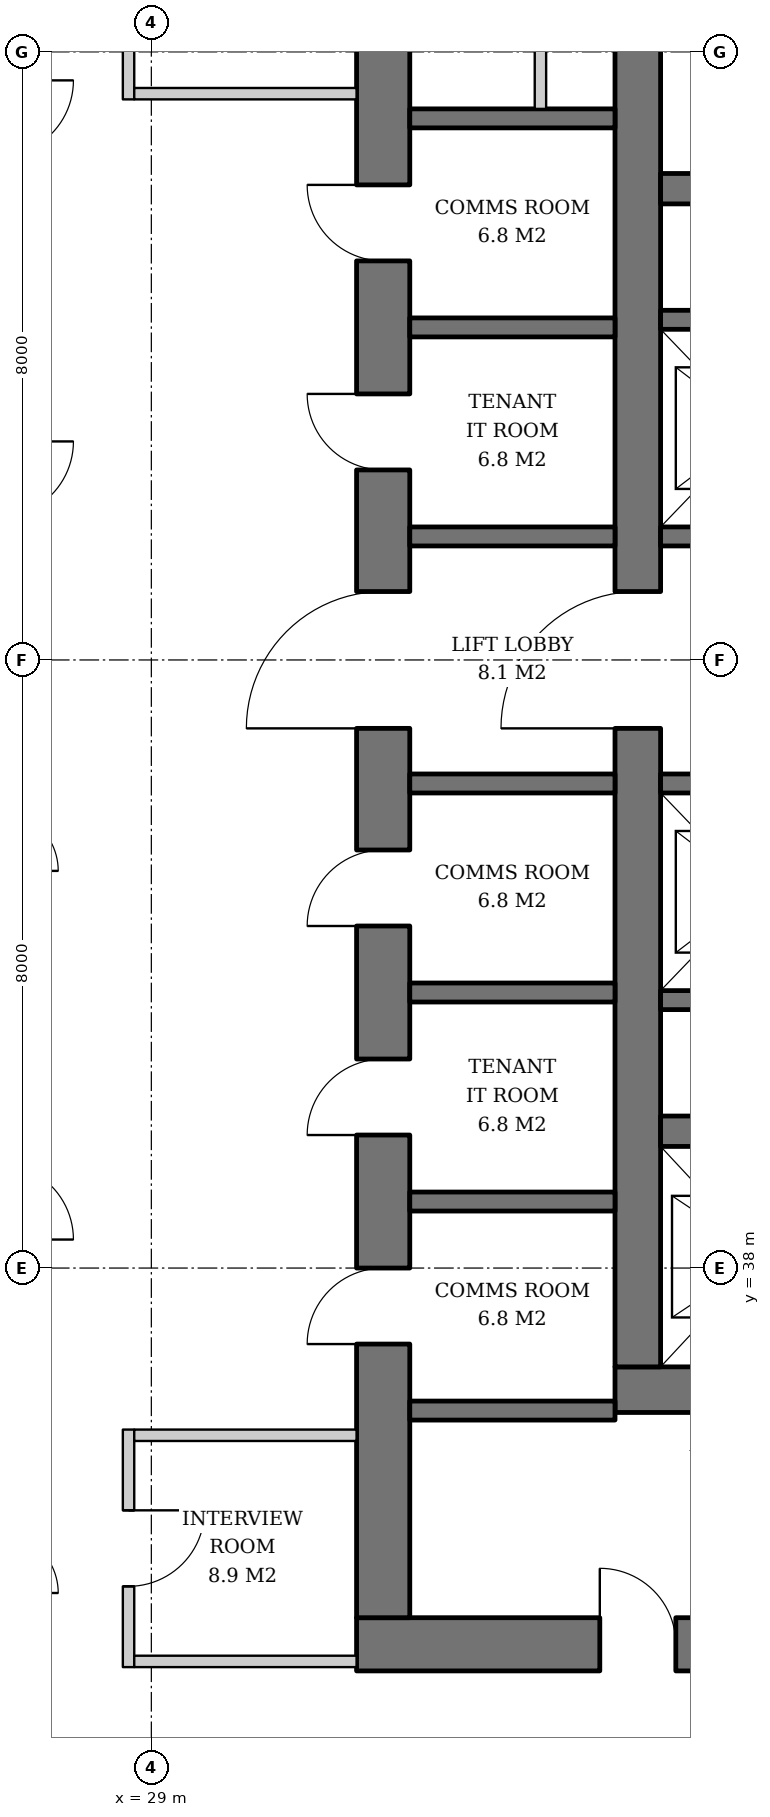
"""IFC4 building model, lengths in metres.
Left out: names, types, materials, properties, quantities, classifications, styles, units other than length and angle.
Written with IfcOpenShell. Run it as: python <this file> out.ifc"""

import sys

from ifc_helpers import new_model, si_unit, direction, frame, frame_2d, origin, place, context, subcontext, project, spatial, rectangle, extrude, element, fill, save


model = new_model("IFC4")
c1 = context("Model", 3, precision=1e-05, world=origin(), true_north=direction((0.0, 1.0)))
c2 = subcontext(c1, "Body", "Model", "MODEL_VIEW")
j1 = project(units=[si_unit("LENGTHUNIT", "METRE"), si_unit("PLANEANGLEUNIT", "RADIAN")], contexts=[c1])
p1 = place(None, origin())
s1 = spatial("IfcSite", under=j1, at=p1, CompositionType="ELEMENT")
p2 = place(p1, origin())
s2 = spatial("IfcBuilding", under=s1, at=p2, CompositionType="ELEMENT")
p3 = place(p2, frame((0.0, 0.0, 131.2)))
s3 = spatial("IfcBuildingStorey", under=s2, at=p3, CompositionType="ELEMENT", Elevation=131.2)
p4 = place(p3, frame((35.1, 36.4, 0.0), z_axis=(0.0, 0.0, 1.0), x_axis=(1.0, 0.0, 0.0)))
e1 = element("IfcWall", 1, at=p4, inside=s3, PredefinedType="SHEAR", context=c2, shape_type="SweptSolid", body=[
    extrude(rectangle(XDim=19.8, YDim=0.6, at=frame_2d((9.9, 0.0))), origin(), (0.0, 0.0, 1.0), 3.8),
])
p5 = place(p4, frame((3.9, 0.0, 0.0)))
e2 = element("IfcOpeningElement", 2, at=p5, cuts=e1, PredefinedType="OPENING", context=c2, shape_type="SweptSolid", body=[
    extrude(rectangle(XDim=1.0, YDim=2.1, at=frame_2d((0.5, 1.05))), frame((0.0, 0.31, 0.0), z_axis=(0.0, -1.0, 0.0), x_axis=(1.0, 0.0, 0.0)), (0.0, 0.0, 1.0), 0.62),
])
p6 = place(p4, frame((15.35, 0.0, 0.0)))
e3 = element("IfcOpeningElement", 3, at=p6, cuts=e1, PredefinedType="OPENING", context=c2, shape_type="SweptSolid", body=[
    extrude(rectangle(XDim=1.0, YDim=2.1, at=frame_2d((0.5, 1.05))), frame((0.0, 0.31, 0.0), z_axis=(0.0, -1.0, 0.0), x_axis=(1.0, 0.0, 0.0)), (0.0, 0.0, 1.0), 0.62),
])
p7 = place(p3, frame((35.4, 36.7, 0.0), z_axis=(0.0, 0.0, 1.0), x_axis=(0.0, 1.0, 0.0)))
e4 = element("IfcWall", 4, at=p7, inside=s3, PredefinedType="SHEAR", context=c2, shape_type="SweptSolid", body=[
    extrude(rectangle(XDim=18.6, YDim=0.6, at=frame_2d((9.3, 0.0))), origin(), (0.0, 0.0, 1.0), 3.8),
])
p8 = place(p7, frame((8.4, 0.0, 0.0)))
e5 = element("IfcOpeningElement", 5, at=p8, cuts=e4, PredefinedType="OPENING", context=c2, shape_type="SweptSolid", body=[
    extrude(rectangle(XDim=1.8, YDim=2.4, at=frame_2d((0.9, 1.2))), frame((0.0, 0.31, 0.0), z_axis=(0.0, -1.0, 0.0), x_axis=(1.0, 0.0, 0.0)), (0.0, 0.0, 1.0), 0.62),
])
p9 = place(p3, frame((31.7, 33.05, 0.0), z_axis=(0.0, 0.0, 1.0), x_axis=(1.0, 0.0, 0.0)))
e6 = element("IfcWall", 6, at=p9, inside=s3, PredefinedType="SHEAR", context=c2, shape_type="SweptSolid", body=[
    extrude(rectangle(XDim=26.6, YDim=0.7, at=frame_2d((13.3, 0.0))), origin(), (0.0, 0.0, 1.0), 3.8),
])
p10 = place(p9, frame((7.3, 0.0, 0.0)))
e7 = element("IfcOpeningElement", 7, at=p10, cuts=e6, PredefinedType="OPENING", context=c2, shape_type="SweptSolid", body=[
    extrude(rectangle(XDim=1.0, YDim=2.1, at=frame_2d((0.5, 1.05))), frame((0.0, 0.36, 0.0), z_axis=(0.0, -1.0, 0.0), x_axis=(1.0, 0.0, 0.0)), (0.0, 0.0, 1.0), 0.72),
])
p11 = place(p9, frame((18.75, 0.0, 0.0)))
e8 = element("IfcOpeningElement", 8, at=p11, cuts=e6, PredefinedType="OPENING", context=c2, shape_type="SweptSolid", body=[
    extrude(rectangle(XDim=1.0, YDim=2.1, at=frame_2d((0.5, 1.05))), frame((0.0, 0.36, 0.0), z_axis=(0.0, -1.0, 0.0), x_axis=(1.0, 0.0, 0.0)), (0.0, 0.0, 1.0), 0.72),
])
p12 = place(p9, frame((3.2, 0.0, 0.0)))
e9 = element("IfcOpeningElement", 9, at=p12, cuts=e6, PredefinedType="OPENING", context=c2, shape_type="SweptSolid", body=[
    extrude(rectangle(XDim=1.0, YDim=2.1, at=frame_2d((0.5, 1.05))), frame((0.0, 0.36, 0.0), z_axis=(0.0, -1.0, 0.0), x_axis=(1.0, 0.0, 0.0)), (0.0, 0.0, 1.0), 0.72),
])
p13 = place(p9, frame((10.42, 0.0, 0.0)))
e10 = element("IfcOpeningElement", 10, at=p13, cuts=e6, PredefinedType="OPENING", context=c2, shape_type="SweptSolid", body=[
    extrude(rectangle(XDim=1.0, YDim=2.1, at=frame_2d((0.5, 1.05))), frame((0.0, 0.36, 0.0), z_axis=(0.0, -1.0, 0.0), x_axis=(1.0, 0.0, 0.0)), (0.0, 0.0, 1.0), 0.72),
])
p14 = place(p9, frame((14.46, 0.0, 0.0)))
e11 = element("IfcOpeningElement", 11, at=p14, cuts=e6, PredefinedType="OPENING", context=c2, shape_type="SweptSolid", body=[
    extrude(rectangle(XDim=1.0, YDim=2.1, at=frame_2d((0.5, 1.05))), frame((0.0, 0.36, 0.0), z_axis=(0.0, -1.0, 0.0), x_axis=(1.0, 0.0, 0.0)), (0.0, 0.0, 1.0), 0.72),
])
p15 = place(p9, frame((22.5, 0.0, 0.0)))
e12 = element("IfcOpeningElement", 12, at=p15, cuts=e6, PredefinedType="OPENING", context=c2, shape_type="SweptSolid", body=[
    extrude(rectangle(XDim=1.0, YDim=2.1, at=frame_2d((0.5, 1.05))), frame((0.0, 0.36, 0.0), z_axis=(0.0, -1.0, 0.0), x_axis=(1.0, 0.0, 0.0)), (0.0, 0.0, 1.0), 0.72),
])
p16 = place(p3, frame((32.05, 33.4, 0.0), z_axis=(0.0, 0.0, 1.0), x_axis=(0.0, 1.0, 0.0)))
e13 = element("IfcWall", 13, at=p16, inside=s3, PredefinedType="SHEAR", context=c2, shape_type="SweptSolid", body=[
    extrude(rectangle(XDim=25.2, YDim=0.7, at=frame_2d((12.6, 0.0))), origin(), (0.0, 0.0, 1.0), 3.8),
])
p17 = place(p16, frame((11.7, 0.0, 0.0)))
e14 = element("IfcOpeningElement", 14, at=p17, cuts=e13, PredefinedType="OPENING", context=c2, shape_type="SweptSolid", body=[
    extrude(rectangle(XDim=1.8, YDim=2.4, at=frame_2d((0.9, 1.2))), frame((0.0, 0.36, 0.0), z_axis=(0.0, -1.0, 0.0), x_axis=(1.0, 0.0, 0.0)), (0.0, 0.0, 1.0), 0.72),
])
p18 = place(p16, frame((3.6, 0.0, 0.0)))
e15 = element("IfcOpeningElement", 15, at=p18, cuts=e13, PredefinedType="OPENING", context=c2, shape_type="SweptSolid", body=[
    extrude(rectangle(XDim=1.0, YDim=2.1, at=frame_2d((0.5, 1.05))), frame((0.0, 0.36, 0.0), z_axis=(0.0, -1.0, 0.0), x_axis=(1.0, 0.0, 0.0)), (0.0, 0.0, 1.0), 0.72),
])
p19 = place(p16, frame((6.35, 0.0, 0.0)))
e16 = element("IfcOpeningElement", 16, at=p19, cuts=e13, PredefinedType="OPENING", context=c2, shape_type="SweptSolid", body=[
    extrude(rectangle(XDim=1.0, YDim=2.1, at=frame_2d((0.5, 1.05))), frame((0.0, 0.36, 0.0), z_axis=(0.0, -1.0, 0.0), x_axis=(1.0, 0.0, 0.0)), (0.0, 0.0, 1.0), 0.72),
])
p20 = place(p16, frame((9.1, 0.0, 0.0)))
e17 = element("IfcOpeningElement", 17, at=p20, cuts=e13, PredefinedType="OPENING", context=c2, shape_type="SweptSolid", body=[
    extrude(rectangle(XDim=1.0, YDim=2.1, at=frame_2d((0.5, 1.05))), frame((0.0, 0.36, 0.0), z_axis=(0.0, -1.0, 0.0), x_axis=(1.0, 0.0, 0.0)), (0.0, 0.0, 1.0), 0.72),
])
p21 = place(p16, frame((15.1, 0.0, 0.0)))
e18 = element("IfcOpeningElement", 18, at=p21, cuts=e13, PredefinedType="OPENING", context=c2, shape_type="SweptSolid", body=[
    extrude(rectangle(XDim=1.0, YDim=2.1, at=frame_2d((0.5, 1.05))), frame((0.0, 0.36, 0.0), z_axis=(0.0, -1.0, 0.0), x_axis=(1.0, 0.0, 0.0)), (0.0, 0.0, 1.0), 0.72),
])
p22 = place(p16, frame((17.85, 0.0, 0.0)))
e19 = element("IfcOpeningElement", 19, at=p22, cuts=e13, PredefinedType="OPENING", context=c2, shape_type="SweptSolid", body=[
    extrude(rectangle(XDim=1.0, YDim=2.1, at=frame_2d((0.5, 1.05))), frame((0.0, 0.36, 0.0), z_axis=(0.0, -1.0, 0.0), x_axis=(1.0, 0.0, 0.0)), (0.0, 0.0, 1.0), 0.72),
])
for number, where, z_axis, x_axis in (
    (20, (35.7, 39.8, 0.0), (0.0, 0.0, 1.0), (1.0, 0.0, 0.0)),
    (21, (35.7, 52.2, 0.0), (0.0, 0.0, 1.0), (1.0, 0.0, 0.0)),
):
    element("IfcWall", number, at=place(p3, frame(where, z_axis=z_axis, x_axis=x_axis)), inside=s3, PredefinedType="SHEAR", context=c2, shape_type="SweptSolid", body=[
        extrude(rectangle(XDim=18.6, YDim=0.4, at=frame_2d((9.3, 0.0))), origin(), (0.0, 0.0, 1.0), 3.8),
    ])
p23 = place(p3, frame((35.7, 50.475, 0.0), z_axis=(0.0, 0.0, 1.0), x_axis=(1.0, 0.0, 0.0)))
e22 = element("IfcWall", 22, at=p23, inside=s3, PredefinedType="SHEAR", context=c2, shape_type="SweptSolid", body=[
    extrude(rectangle(XDim=11.0, YDim=0.25, at=frame_2d((5.5, 0.0))), origin(), (0.0, 0.0, 1.0), 3.8),
])
p24 = place(p3, frame((35.7, 47.625, 0.0), z_axis=(0.0, 0.0, 1.0), x_axis=(1.0, 0.0, 0.0)))
e23 = element("IfcWall", 23, at=p24, inside=s3, PredefinedType="SHEAR", context=c2, shape_type="SweptSolid", body=[
    extrude(rectangle(XDim=12.83, YDim=0.25, at=frame_2d((6.415, 0.0))), origin(), (0.0, 0.0, 1.0), 3.8),
])
p25 = place(p24, frame((0.7, 0.0, 0.0)))
e24 = element("IfcOpeningElement", 24, at=p25, cuts=e23, PredefinedType="OPENING", context=c2, shape_type="SweptSolid", body=[
    extrude(rectangle(XDim=1.1, YDim=2.2, at=frame_2d((0.55, 1.1))), frame((0.0, 0.135, 0.0), z_axis=(0.0, -1.0, 0.0), x_axis=(1.0, 0.0, 0.0)), (0.0, 0.0, 1.0), 0.27),
])
p26 = place(p24, frame((3.45, 0.0, 0.0)))
e25 = element("IfcOpeningElement", 25, at=p26, cuts=e23, PredefinedType="OPENING", context=c2, shape_type="SweptSolid", body=[
    extrude(rectangle(XDim=1.1, YDim=2.2, at=frame_2d((0.55, 1.1))), frame((0.0, 0.135, 0.0), z_axis=(0.0, -1.0, 0.0), x_axis=(1.0, 0.0, 0.0)), (0.0, 0.0, 1.0), 0.27),
])
p27 = place(p24, frame((6.2, 0.0, 0.0)))
e26 = element("IfcOpeningElement", 26, at=p27, cuts=e23, PredefinedType="OPENING", context=c2, shape_type="SweptSolid", body=[
    extrude(rectangle(XDim=1.1, YDim=2.2, at=frame_2d((0.55, 1.1))), frame((0.0, 0.135, 0.0), z_axis=(0.0, -1.0, 0.0), x_axis=(1.0, 0.0, 0.0)), (0.0, 0.0, 1.0), 0.27),
])
p28 = place(p24, frame((8.95, 0.0, 0.0)))
e27 = element("IfcOpeningElement", 27, at=p28, cuts=e23, PredefinedType="OPENING", context=c2, shape_type="SweptSolid", body=[
    extrude(rectangle(XDim=1.1, YDim=2.2, at=frame_2d((0.55, 1.1))), frame((0.0, 0.135, 0.0), z_axis=(0.0, -1.0, 0.0), x_axis=(1.0, 0.0, 0.0)), (0.0, 0.0, 1.0), 0.27),
])
p29 = place(p24, frame((11.515, 0.0, 0.0)))
e28 = element("IfcOpeningElement", 28, at=p29, cuts=e23, PredefinedType="OPENING", context=c2, shape_type="SweptSolid", body=[
    extrude(rectangle(XDim=0.8, YDim=2.0, at=frame_2d((0.4, 1.0))), frame((0.0, 0.135, 0.0), z_axis=(0.0, -1.0, 0.0), x_axis=(1.0, 0.0, 0.0)), (0.0, 0.0, 1.0), 0.27),
])
p30 = place(p3, frame((35.7, 41.525, 0.0), z_axis=(0.0, 0.0, 1.0), x_axis=(1.0, 0.0, 0.0)))
e29 = element("IfcWall", 29, at=p30, inside=s3, PredefinedType="SHEAR", context=c2, shape_type="SweptSolid", body=[
    extrude(rectangle(XDim=11.0, YDim=0.25, at=frame_2d((5.5, 0.0))), origin(), (0.0, 0.0, 1.0), 3.8),
])
p31 = place(p3, frame((35.7, 44.375, 0.0), z_axis=(0.0, 0.0, 1.0), x_axis=(1.0, 0.0, 0.0)))
e30 = element("IfcWall", 30, at=p31, inside=s3, PredefinedType="SHEAR", context=c2, shape_type="SweptSolid", body=[
    extrude(rectangle(XDim=12.83, YDim=0.25, at=frame_2d((6.415, 0.0))), origin(), (0.0, 0.0, 1.0), 3.8),
])
p32 = place(p31, frame((0.7, 0.0, 0.0)))
e31 = element("IfcOpeningElement", 31, at=p32, cuts=e30, PredefinedType="OPENING", context=c2, shape_type="SweptSolid", body=[
    extrude(rectangle(XDim=1.1, YDim=2.2, at=frame_2d((0.55, 1.1))), frame((0.0, 0.135, 0.0), z_axis=(0.0, -1.0, 0.0), x_axis=(1.0, 0.0, 0.0)), (0.0, 0.0, 1.0), 0.27),
])
p33 = place(p31, frame((3.45, 0.0, 0.0)))
e32 = element("IfcOpeningElement", 32, at=p33, cuts=e30, PredefinedType="OPENING", context=c2, shape_type="SweptSolid", body=[
    extrude(rectangle(XDim=1.1, YDim=2.2, at=frame_2d((0.55, 1.1))), frame((0.0, 0.135, 0.0), z_axis=(0.0, -1.0, 0.0), x_axis=(1.0, 0.0, 0.0)), (0.0, 0.0, 1.0), 0.27),
])
p34 = place(p31, frame((6.2, 0.0, 0.0)))
e33 = element("IfcOpeningElement", 33, at=p34, cuts=e30, PredefinedType="OPENING", context=c2, shape_type="SweptSolid", body=[
    extrude(rectangle(XDim=1.1, YDim=2.2, at=frame_2d((0.55, 1.1))), frame((0.0, 0.135, 0.0), z_axis=(0.0, -1.0, 0.0), x_axis=(1.0, 0.0, 0.0)), (0.0, 0.0, 1.0), 0.27),
])
p35 = place(p31, frame((8.95, 0.0, 0.0)))
e34 = element("IfcOpeningElement", 34, at=p35, cuts=e30, PredefinedType="OPENING", context=c2, shape_type="SweptSolid", body=[
    extrude(rectangle(XDim=1.1, YDim=2.2, at=frame_2d((0.55, 1.1))), frame((0.0, 0.135, 0.0), z_axis=(0.0, -1.0, 0.0), x_axis=(1.0, 0.0, 0.0)), (0.0, 0.0, 1.0), 0.27),
])
p36 = place(p31, frame((11.515, 0.0, 0.0)))
e35 = element("IfcOpeningElement", 35, at=p36, cuts=e30, PredefinedType="OPENING", context=c2, shape_type="SweptSolid", body=[
    extrude(rectangle(XDim=0.8, YDim=2.0, at=frame_2d((0.4, 1.0))), frame((0.0, 0.135, 0.0), z_axis=(0.0, -1.0, 0.0), x_axis=(1.0, 0.0, 0.0)), (0.0, 0.0, 1.0), 0.27),
])
for number, where, z_axis, x_axis in (
    (36, (32.4, 36.125, 0.0), (0.0, 0.0, 1.0), (1.0, 0.0, 0.0)),
    (37, (32.4, 38.875, 0.0), (0.0, 0.0, 1.0), (1.0, 0.0, 0.0)),
    (38, (32.4, 41.625, 0.0), (0.0, 0.0, 1.0), (1.0, 0.0, 0.0)),
    (39, (32.4, 44.375, 0.0), (0.0, 0.0, 1.0), (1.0, 0.0, 0.0)),
    (40, (32.4, 47.625, 0.0), (0.0, 0.0, 1.0), (1.0, 0.0, 0.0)),
    (41, (32.4, 50.375, 0.0), (0.0, 0.0, 1.0), (1.0, 0.0, 0.0)),
    (42, (32.4, 53.125, 0.0), (0.0, 0.0, 1.0), (1.0, 0.0, 0.0)),
):
    element("IfcWall", number, at=place(p3, frame(where, z_axis=z_axis, x_axis=x_axis)), inside=s3, PredefinedType="SHEAR", context=c2, shape_type="SweptSolid", body=[
        extrude(rectangle(XDim=2.7, YDim=0.25, at=frame_2d((1.35, 0.0))), origin(), (0.0, 0.0, 1.0), 3.8),
    ])
p37 = place(p3, frame((34.119, 53.25, 0.0), z_axis=(0.0, 0.0, 1.0), x_axis=(0.0, 1.0, 0.0)))
e43 = element("IfcWall", 43, at=p37, inside=s3, PredefinedType="SOLIDWALL", context=c2, shape_type="SweptSolid", body=[
    extrude(rectangle(XDim=5.35, YDim=0.15, at=frame_2d((2.675, 0.0))), origin(), (0.0, 0.0, 1.0), 3.62),
])
p38 = place(p3, frame((28.7, 59.25, 0.0), z_axis=(0.0, 0.0, 1.0), x_axis=(0.0, -1.0, 0.0)))
e44 = element("IfcWall", 44, at=p38, inside=s3, PredefinedType="PARTITIONING", context=c2, shape_type="SweptSolid", body=[
    extrude(rectangle(XDim=5.875, YDim=0.15, at=frame_2d((2.938, 0.0))), origin(), (0.0, 0.0, 1.0), 2.72),
])
p39 = place(p38, frame((2.438, 0.0, 0.0)))
e45 = element("IfcOpeningElement", 45, at=p39, cuts=e44, PredefinedType="OPENING", context=c2, shape_type="SweptSolid", body=[
    extrude(rectangle(XDim=1.0, YDim=2.1, at=frame_2d((0.5, 1.05))), frame((0.0, 0.085, 0.0), z_axis=(0.0, -1.0, 0.0), x_axis=(1.0, 0.0, 0.0)), (0.0, 0.0, 1.0), 0.17),
])
p40 = place(p3, frame((31.7, 53.45, 0.0), z_axis=(0.0, 0.0, 1.0), x_axis=(-1.0, 0.0, 0.0)))
e46 = element("IfcWall", 46, at=p40, inside=s3, PredefinedType="PARTITIONING", context=c2, shape_type="SweptSolid", body=[
    extrude(rectangle(XDim=2.925, YDim=0.15, at=frame_2d((1.462, 0.0))), origin(), (0.0, 0.0, 1.0), 3.62),
])
p41 = place(p3, frame((28.7, 35.875, 0.0), z_axis=(0.0, 0.0, 1.0), x_axis=(0.0, -1.0, 0.0)))
e47 = element("IfcWall", 47, at=p41, inside=s3, PredefinedType="PARTITIONING", context=c2, shape_type="SweptSolid", body=[
    extrude(rectangle(XDim=3.125, YDim=0.15, at=frame_2d((1.562, 0.0))), origin(), (0.0, 0.0, 1.0), 2.806),
])
p42 = place(p41, frame((1.062, 0.0, 0.0)))
e48 = element("IfcOpeningElement", 48, at=p42, cuts=e47, PredefinedType="OPENING", context=c2, shape_type="SweptSolid", body=[
    extrude(rectangle(XDim=1.0, YDim=2.1, at=frame_2d((0.5, 1.05))), frame((0.0, 0.085, 0.0), z_axis=(0.0, -1.0, 0.0), x_axis=(1.0, 0.0, 0.0)), (0.0, 0.0, 1.0), 0.17),
])
for number, where, z_axis, x_axis in (
    (49, (31.7, 35.8, 0.0), (0.0, 0.0, 1.0), (-1.0, 0.0, 0.0)),
    (50, (31.7, 32.825, 0.0), (0.0, 0.0, 1.0), (-1.0, 0.0, 0.0)),
):
    element("IfcWall", number, at=place(p3, frame(where, z_axis=z_axis, x_axis=x_axis)), inside=s3, PredefinedType="PARTITIONING", context=c2, shape_type="SweptSolid", body=[
        extrude(rectangle(XDim=2.925, YDim=0.15, at=frame_2d((1.462, 0.0))), origin(), (0.0, 0.0, 1.0), 3.62),
    ])
p43 = place(p8, origin())
e51 = element("IfcDoor", 51, at=p43, inside=s3, OperationType="DOUBLE_DOOR_SINGLE_SWING", PredefinedType="DOOR", context=c2, shape_type="SweptSolid", body=[
    extrude(rectangle(XDim=1.8, YDim=2.4, at=frame_2d((0.9, 1.2))), frame((0.0, 0.025, 0.0), z_axis=(0.0, -1.0, 0.0), x_axis=(1.0, 0.0, 0.0)), (0.0, 0.0, 1.0), 0.05),
])
fill(e5, e51)
p44 = place(p17, origin())
e52 = element("IfcDoor", 52, at=p44, inside=s3, OperationType="DOUBLE_DOOR_SINGLE_SWING", PredefinedType="DOOR", context=c2, shape_type="SweptSolid", body=[
    extrude(rectangle(XDim=1.8, YDim=2.4, at=frame_2d((0.9, 1.2))), frame((0.0, 0.025, 0.0), z_axis=(0.0, -1.0, 0.0), x_axis=(1.0, 0.0, 0.0)), (0.0, 0.0, 1.0), 0.05),
])
fill(e14, e52)
p45 = place(p18, origin())
e53 = element("IfcDoor", 53, at=p45, inside=s3, OperationType="SINGLE_SWING_LEFT", PredefinedType="DOOR", context=c2, shape_type="SweptSolid", body=[
    extrude(rectangle(XDim=1.0, YDim=2.1, at=frame_2d((0.5, 1.05))), frame((0.0, -0.29, 0.0), z_axis=(0.0, -1.0, 0.0), x_axis=(1.0, 0.0, 0.0)), (0.0, 0.0, 1.0), 0.05),
])
fill(e15, e53)
p46 = place(p19, origin())
e54 = element("IfcDoor", 54, at=p46, inside=s3, OperationType="SINGLE_SWING_LEFT", PredefinedType="DOOR", context=c2, shape_type="SweptSolid", body=[
    extrude(rectangle(XDim=1.0, YDim=2.1, at=frame_2d((0.5, 1.05))), frame((0.0, -0.29, 0.0), z_axis=(0.0, -1.0, 0.0), x_axis=(1.0, 0.0, 0.0)), (0.0, 0.0, 1.0), 0.05),
])
fill(e16, e54)
p47 = place(p20, origin())
e55 = element("IfcDoor", 55, at=p47, inside=s3, OperationType="SINGLE_SWING_LEFT", PredefinedType="DOOR", context=c2, shape_type="SweptSolid", body=[
    extrude(rectangle(XDim=1.0, YDim=2.1, at=frame_2d((0.5, 1.05))), frame((0.0, -0.29, 0.0), z_axis=(0.0, -1.0, 0.0), x_axis=(1.0, 0.0, 0.0)), (0.0, 0.0, 1.0), 0.05),
])
fill(e17, e55)
p48 = place(p21, origin())
e56 = element("IfcDoor", 56, at=p48, inside=s3, OperationType="SINGLE_SWING_RIGHT", PredefinedType="DOOR", context=c2, shape_type="SweptSolid", body=[
    extrude(rectangle(XDim=1.0, YDim=2.1, at=frame_2d((0.5, 1.05))), frame((0.0, -0.29, 0.0), z_axis=(0.0, -1.0, 0.0), x_axis=(1.0, 0.0, 0.0)), (0.0, 0.0, 1.0), 0.05),
])
fill(e18, e56)
p49 = place(p22, origin())
e57 = element("IfcDoor", 57, at=p49, inside=s3, OperationType="SINGLE_SWING_RIGHT", PredefinedType="DOOR", context=c2, shape_type="SweptSolid", body=[
    extrude(rectangle(XDim=1.0, YDim=2.1, at=frame_2d((0.5, 1.05))), frame((0.0, -0.29, 0.0), z_axis=(0.0, -1.0, 0.0), x_axis=(1.0, 0.0, 0.0)), (0.0, 0.0, 1.0), 0.05),
])
fill(e19, e57)
p50 = place(p12, origin())
e58 = element("IfcDoor", 58, at=p50, inside=s3, OperationType="SINGLE_SWING_LEFT", PredefinedType="DOOR", context=c2, shape_type="SweptSolid", body=[
    extrude(rectangle(XDim=1.0, YDim=2.1, at=frame_2d((0.5, 1.05))), frame((0.0, 0.34, 0.0), z_axis=(0.0, -1.0, 0.0), x_axis=(1.0, 0.0, 0.0)), (0.0, 0.0, 1.0), 0.05),
])
fill(e9, e58)
p51 = place(p42, origin())
e59 = element("IfcDoor", 59, at=p51, inside=s3, OperationType="SINGLE_SWING_LEFT", PredefinedType="DOOR", context=c2, shape_type="SweptSolid", body=[
    extrude(rectangle(XDim=1.0, YDim=2.1, at=frame_2d((0.5, 1.05))), frame((0.0, 0.025, 0.0), z_axis=(0.0, -1.0, 0.0), x_axis=(1.0, 0.0, 0.0)), (0.0, 0.0, 1.0), 0.05),
])
fill(e48, e59)
save(model, sys.argv[1])
